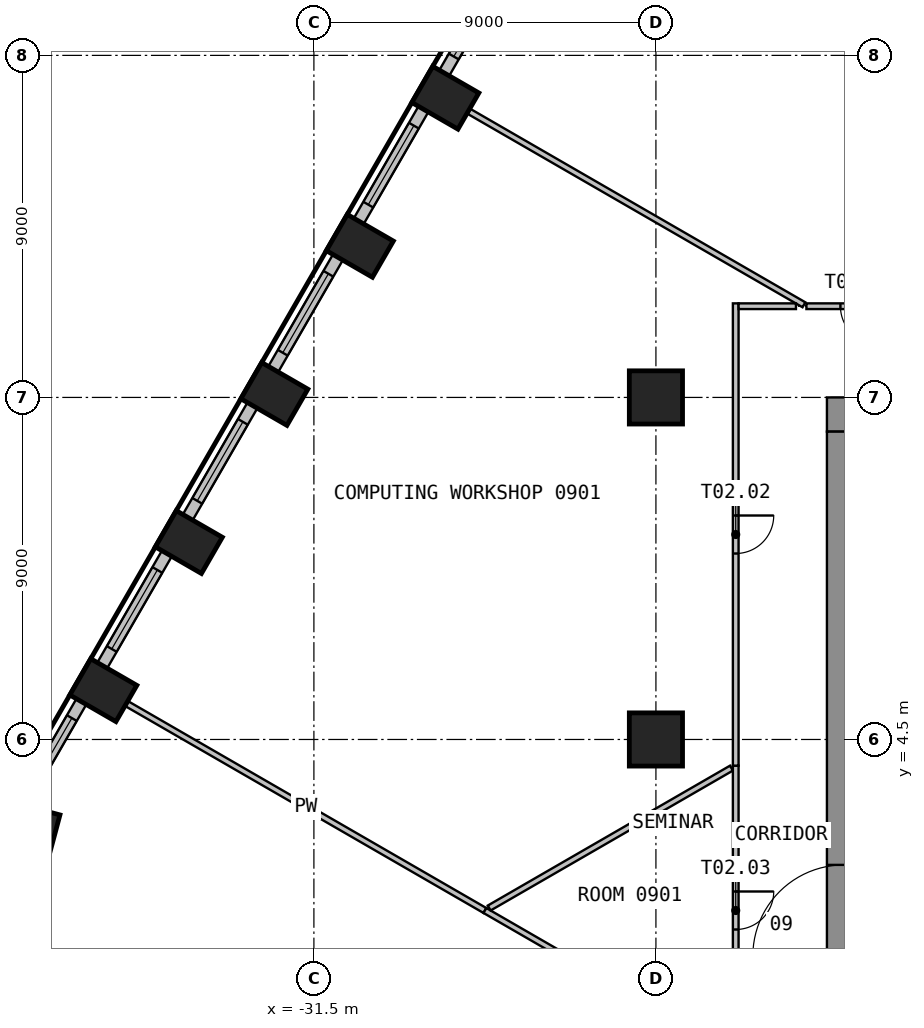
"""IFC4 building model, lengths in metres.
Left out: names, types, materials, properties, quantities, classifications, styles, units other than length and angle.
Written with IfcOpenShell. Run it as: python <this file> out.ifc"""

import sys

from ifc_helpers import new_model, si_unit, direction, frame, frame_2d, origin, origin_2d, place, context, subcontext, project, spatial, rectangle, circle, extrude, element, fill, save


model = new_model("IFC4")
c1 = context("Model", 3, precision=1e-05, world=origin(), true_north=direction((0.0, 1.0)))
c2 = subcontext(c1, "Body", "Model", "MODEL_VIEW")
j1 = project(units=[si_unit("LENGTHUNIT", "METRE"), si_unit("PLANEANGLEUNIT", "RADIAN")], contexts=[c1])
p1 = place(None, origin())
s1 = spatial("IfcSite", under=j1, at=p1, CompositionType="ELEMENT")
p2 = place(p1, origin())
s2 = spatial("IfcBuilding", under=s1, at=p2, CompositionType="ELEMENT")
p3 = place(p2, frame((0.0, 0.0, 41.7)))
s3 = spatial("IfcBuildingStorey", under=s2, at=p3, CompositionType="ELEMENT", Elevation=41.7)
for number, where, z_axis, x_axis in (
    (1, (-28.041, 21.385, 0.0), (0.0, 0.0, 1.0), (-0.5, -0.866, 0.0)),
    (2, (-30.291, 17.489, 0.0), (0.0, 0.0, 1.0), (-0.5, -0.866, 0.0)),
    (3, (-32.541, 13.591, 0.0), (0.0, 0.0, 1.0), (-0.5, -0.866, 0.0)),
    (4, (-34.791, 9.694, 0.0), (0.0, 0.0, 1.0), (-0.5, -0.866, 0.0)),
    (5, (-37.041, 5.797, 0.0), (0.0, 0.0, 1.0), (-0.5, -0.866, 0.0)),
):
    element("IfcColumn", number, at=place(p3, frame(where, z_axis=z_axis, x_axis=x_axis)), inside=s3, PredefinedType="COLUMN", context=c2, shape_type="SweptSolid", body=[
        extrude(rectangle(XDim=1.1, YDim=1.4, at=origin_2d()), origin(), (0.0, 0.0, 1.0), 3.525),
    ])
p4 = place(p3, frame((-39.04, 2.02, 0.0), z_axis=(0.0, 0.0, 1.0), x_axis=(-0.258819045103, -0.965925826289, 0.0)))
e6 = element("IfcColumn", 6, at=p4, inside=s3, PredefinedType="COLUMN", context=c2, shape_type="SweptSolid", body=[
    extrude(rectangle(XDim=1.4, YDim=1.4, at=origin_2d()), origin(), (0.0, 0.0, 1.0), 3.525),
])
for number, where, z_axis, x_axis in (
    (7, (-22.5, 4.5, 0.0), (0.0, 0.0, 1.0), (1.0, 0.0, 0.0)),
    (8, (-22.5, 13.5, 0.0), (0.0, 0.0, 1.0), (1.0, 0.0, 0.0)),
):
    element("IfcColumn", number, at=place(p3, frame(where, z_axis=z_axis, x_axis=x_axis)), inside=s3, PredefinedType="COLUMN", context=c2, shape_type="SweptSolid", body=[
        extrude(circle(Radius=0.7, at=origin_2d()), origin(), (0.0, 0.0, 1.0), 3.525),
    ])
p5 = place(p3, frame((-26.369, 24.981, 0.0), z_axis=(0.0, 0.0, 1.0), x_axis=(-0.499993955907, -0.866028893315, 0.0)))
e9 = element("IfcWall", 9, at=p5, inside=s3, PredefinedType="SOLIDWALL", context=c2, shape_type="SweptSolid", body=[
    extrude(rectangle(XDim=3.399, YDim=0.3, at=frame_2d((1.699, 0.0))), origin(), (0.0, 0.0, 1.0), 3.525),
])
p6 = place(p5, frame((0.5, 0.0, 0.9)))
e10 = element("IfcOpeningElement", 10, at=p6, cuts=e9, PredefinedType="OPENING", context=c2, shape_type="SweptSolid", body=[
    extrude(rectangle(XDim=2.4, YDim=2.1, at=frame_2d((1.2, 1.05))), frame((0.0, 0.16, 0.0), z_axis=(0.0, -1.0, 0.0), x_axis=(1.0, 0.0, 0.0)), (0.0, 0.0, 1.0), 0.32),
])
p7 = place(p3, frame((-28.619, 21.084, 0.0), z_axis=(0.0, 0.0, 1.0), x_axis=(-0.499993955907, -0.866028893315, 0.0)))
e11 = element("IfcWall", 11, at=p7, inside=s3, PredefinedType="SOLIDWALL", context=c2, shape_type="SweptSolid", body=[
    extrude(rectangle(XDim=3.399, YDim=0.3, at=frame_2d((1.699, 0.0))), origin(), (0.0, 0.0, 1.0), 3.525),
])
p8 = place(p7, frame((0.5, 0.0, 0.9)))
e12 = element("IfcOpeningElement", 12, at=p8, cuts=e11, PredefinedType="OPENING", context=c2, shape_type="SweptSolid", body=[
    extrude(rectangle(XDim=2.4, YDim=2.1, at=frame_2d((1.2, 1.05))), frame((0.0, 0.16, 0.0), z_axis=(0.0, -1.0, 0.0), x_axis=(1.0, 0.0, 0.0)), (0.0, 0.0, 1.0), 0.32),
])
p9 = place(p3, frame((-30.869, 17.187, 0.0), z_axis=(0.0, 0.0, 1.0), x_axis=(-0.499993955907, -0.866028893315, 0.0)))
e13 = element("IfcWall", 13, at=p9, inside=s3, PredefinedType="SOLIDWALL", context=c2, shape_type="SweptSolid", body=[
    extrude(rectangle(XDim=3.399, YDim=0.3, at=frame_2d((1.699, 0.0))), origin(), (0.0, 0.0, 1.0), 3.525),
])
p10 = place(p9, frame((0.5, 0.0, 0.9)))
e14 = element("IfcOpeningElement", 14, at=p10, cuts=e13, PredefinedType="OPENING", context=c2, shape_type="SweptSolid", body=[
    extrude(rectangle(XDim=2.4, YDim=2.1, at=frame_2d((1.2, 1.05))), frame((0.0, 0.16, 0.0), z_axis=(0.0, -1.0, 0.0), x_axis=(1.0, 0.0, 0.0)), (0.0, 0.0, 1.0), 0.32),
])
p11 = place(p3, frame((-33.119, 13.29, 0.0), z_axis=(0.0, 0.0, 1.0), x_axis=(-0.499993955907, -0.866028893315, 0.0)))
e15 = element("IfcWall", 15, at=p11, inside=s3, PredefinedType="SOLIDWALL", context=c2, shape_type="SweptSolid", body=[
    extrude(rectangle(XDim=3.399, YDim=0.3, at=frame_2d((1.699, 0.0))), origin(), (0.0, 0.0, 1.0), 3.525),
])
p12 = place(p11, frame((0.5, 0.0, 0.9)))
e16 = element("IfcOpeningElement", 16, at=p12, cuts=e15, PredefinedType="OPENING", context=c2, shape_type="SweptSolid", body=[
    extrude(rectangle(XDim=2.4, YDim=2.1, at=frame_2d((1.2, 1.05))), frame((0.0, 0.16, 0.0), z_axis=(0.0, -1.0, 0.0), x_axis=(1.0, 0.0, 0.0)), (0.0, 0.0, 1.0), 0.32),
])
p13 = place(p3, frame((-35.369, 9.393, 0.0), z_axis=(0.0, 0.0, 1.0), x_axis=(-0.499993955907, -0.866028893315, 0.0)))
e17 = element("IfcWall", 17, at=p13, inside=s3, PredefinedType="SOLIDWALL", context=c2, shape_type="SweptSolid", body=[
    extrude(rectangle(XDim=3.399, YDim=0.3, at=frame_2d((1.699, 0.0))), origin(), (0.0, 0.0, 1.0), 3.525),
])
p14 = place(p13, frame((0.5, 0.0, 0.9)))
e18 = element("IfcOpeningElement", 18, at=p14, cuts=e17, PredefinedType="OPENING", context=c2, shape_type="SweptSolid", body=[
    extrude(rectangle(XDim=2.4, YDim=2.1, at=frame_2d((1.2, 1.05))), frame((0.0, 0.16, 0.0), z_axis=(0.0, -1.0, 0.0), x_axis=(1.0, 0.0, 0.0)), (0.0, 0.0, 1.0), 0.32),
])
p15 = place(p3, frame((-37.619, 5.495, 0.0), z_axis=(0.0, 0.0, 1.0), x_axis=(-0.49997090907, -0.866042198789, 0.0)))
e19 = element("IfcWall", 19, at=p15, inside=s3, PredefinedType="SOLIDWALL", context=c2, shape_type="SweptSolid", body=[
    extrude(rectangle(XDim=3.091, YDim=0.3, at=frame_2d((1.545, 0.0))), origin(), (0.0, 0.0, 1.0), 3.525),
])
p16 = place(p15, frame((0.5, 0.0, 0.9)))
e20 = element("IfcOpeningElement", 20, at=p16, cuts=e19, PredefinedType="OPENING", context=c2, shape_type="SweptSolid", body=[
    extrude(rectangle(XDim=2.4, YDim=2.1, at=frame_2d((1.2, 1.05))), frame((0.0, 0.16, 0.0), z_axis=(0.0, -1.0, 0.0), x_axis=(1.0, 0.0, 0.0)), (0.0, 0.0, 1.0), 0.32),
])
p17 = place(p3, frame((-18.0, 13.05, 0.0), z_axis=(0.0, 0.0, 1.0), x_axis=(1.0, 0.0, 0.0)))
e21 = element("IfcWall", 21, at=p17, inside=s3, PredefinedType="SHEAR", context=c2, shape_type="SweptSolid", body=[
    extrude(rectangle(XDim=36.0, YDim=0.9, at=frame_2d((18.0, 0.0))), origin(), (0.0, 0.0, 1.0), 3.525),
])
p18 = place(p17, frame((16.8, 0.0, 0.0)))
e22 = element("IfcOpeningElement", 22, at=p18, cuts=e21, PredefinedType="OPENING", context=c2, shape_type="SweptSolid", body=[
    extrude(rectangle(XDim=2.4, YDim=2.1, at=frame_2d((1.2, 1.05))), frame((0.0, 0.46, 0.0), z_axis=(0.0, -1.0, 0.0), x_axis=(1.0, 0.0, 0.0)), (0.0, 0.0, 1.0), 0.92),
])
p19 = place(p17, frame((5.55, 0.0, 0.0)))
e23 = element("IfcOpeningElement", 23, at=p19, cuts=e21, PredefinedType="OPENING", context=c2, shape_type="SweptSolid", body=[
    extrude(rectangle(XDim=1.2, YDim=2.1, at=frame_2d((0.6, 1.05))), frame((0.0, 0.46, 0.0), z_axis=(0.0, -1.0, 0.0), x_axis=(1.0, 0.0, 0.0)), (0.0, 0.0, 1.0), 0.92),
])
p20 = place(p17, frame((29.25, 0.0, 0.0)))
e24 = element("IfcOpeningElement", 24, at=p20, cuts=e21, PredefinedType="OPENING", context=c2, shape_type="SweptSolid", body=[
    extrude(rectangle(XDim=1.2, YDim=2.1, at=frame_2d((0.6, 1.05))), frame((0.0, 0.46, 0.0), z_axis=(0.0, -1.0, 0.0), x_axis=(1.0, 0.0, 0.0)), (0.0, 0.0, 1.0), 0.92),
])
p21 = place(p3, frame((-17.55, -12.6, 0.0), z_axis=(0.0, 0.0, 1.0), x_axis=(0.0, 1.0, 0.0)))
e25 = element("IfcWall", 25, at=p21, inside=s3, PredefinedType="SHEAR", context=c2, shape_type="SweptSolid", body=[
    extrude(rectangle(XDim=25.2, YDim=0.9, at=frame_2d((12.6, 0.0))), origin(), (0.0, 0.0, 1.0), 3.525),
])
p22 = place(p21, frame((11.4, 0.0, 0.0)))
e26 = element("IfcOpeningElement", 26, at=p22, cuts=e25, PredefinedType="OPENING", context=c2, shape_type="SweptSolid", body=[
    extrude(rectangle(XDim=2.4, YDim=2.1, at=frame_2d((1.2, 1.05))), frame((0.0, 0.46, 0.0), z_axis=(0.0, -1.0, 0.0), x_axis=(1.0, 0.0, 0.0)), (0.0, 0.0, 1.0), 0.92),
])
p23 = place(p3, frame((-36.417, 5.437, 0.0), z_axis=(0.0, 0.0, 1.0), x_axis=(0.866016964551, -0.500014616896, 0.0)))
e27 = element("IfcWall", 27, at=p23, inside=s3, PredefinedType="PARTITIONING", context=c2, shape_type="SweptSolid", body=[
    extrude(rectangle(XDim=10.874, YDim=0.15, at=frame_2d((5.437, 0.0))), origin(), (0.0, 0.0, 1.0), 3.525),
])
p24 = place(p3, frame((-27.417, 21.026, 0.0), z_axis=(0.0, 0.0, 1.0), x_axis=(0.86599299422, -0.500056130812, 0.0)))
e28 = element("IfcWall", 28, at=p24, inside=s3, PredefinedType="PARTITIONING", context=c2, shape_type="SweptSolid", body=[
    extrude(rectangle(XDim=10.176, YDim=0.15, at=frame_2d((5.088, 0.0))), origin(), (0.0, 0.0, 1.0), 3.525),
])
p25 = place(p3, frame((-27.0, 0.0, 0.0), z_axis=(0.0, 0.0, 1.0), x_axis=(0.865996173008, -0.500050625772, 0.0)))
e29 = element("IfcWall", 29, at=p25, inside=s3, PredefinedType="PARTITIONING", context=c2, shape_type="SweptSolid", body=[
    extrude(rectangle(XDim=7.491, YDim=0.15, at=frame_2d((3.746, 0.0))), origin(), (0.0, 0.0, 1.0), 3.525),
])
p26 = place(p3, frame((-20.512, 3.746, 0.0), z_axis=(0.0, 0.0, 1.0), x_axis=(-0.865993380977, -0.500055461028, 0.0)))
e30 = element("IfcWall", 30, at=p26, inside=s3, PredefinedType="PARTITIONING", context=c2, shape_type="SweptSolid", body=[
    extrude(rectangle(XDim=7.362, YDim=0.15, at=frame_2d((3.681, 0.0))), origin(), (0.0, 0.0, 1.0), 3.525),
])
p27 = place(p3, frame((-20.4, 3.811, 0.0), z_axis=(0.0, 0.0, 1.0), x_axis=(0.0, -1.0, 0.0)))
e31 = element("IfcWall", 31, at=p27, inside=s3, PredefinedType="PARTITIONING", context=c2, shape_type="SweptSolid", body=[
    extrude(rectangle(XDim=7.622, YDim=0.15, at=frame_2d((3.811, 0.0))), origin(), (0.0, 0.0, 1.0), 3.525),
])
p28 = place(p27, frame((3.311, 0.0, 0.0)))
e32 = element("IfcOpeningElement", 32, at=p28, cuts=e31, PredefinedType="OPENING", context=c2, shape_type="SweptSolid", body=[
    extrude(rectangle(XDim=1.0, YDim=2.1, at=frame_2d((0.5, 1.05))), frame((0.0, 0.085, 0.0), z_axis=(0.0, -1.0, 0.0), x_axis=(1.0, 0.0, 0.0)), (0.0, 0.0, 1.0), 0.17),
])
p29 = place(p3, frame((-20.4, 15.975, 0.0), z_axis=(0.0, 0.0, 1.0), x_axis=(0.0, -1.0, 0.0)))
e33 = element("IfcWall", 33, at=p29, inside=s3, PredefinedType="PARTITIONING", context=c2, shape_type="SweptSolid", body=[
    extrude(rectangle(XDim=12.164, YDim=0.15, at=frame_2d((6.082, 0.0))), origin(), (0.0, 0.0, 1.0), 3.525),
])
p30 = place(p29, frame((5.582, 0.0, 0.0)))
e34 = element("IfcOpeningElement", 34, at=p30, cuts=e33, PredefinedType="OPENING", context=c2, shape_type="SweptSolid", body=[
    extrude(rectangle(XDim=1.0, YDim=2.1, at=frame_2d((0.5, 1.05))), frame((0.0, 0.085, 0.0), z_axis=(0.0, -1.0, 0.0), x_axis=(1.0, 0.0, 0.0)), (0.0, 0.0, 1.0), 0.17),
])
p31 = place(p3, frame((-18.815, 15.9, 0.0), z_axis=(0.0, 0.0, 1.0), x_axis=(-1.0, 0.0, 0.0)))
e35 = element("IfcWall", 35, at=p31, inside=s3, PredefinedType="PARTITIONING", context=c2, shape_type="SweptSolid", body=[
    extrude(rectangle(XDim=1.51, YDim=0.15, at=frame_2d((0.755, 0.0))), origin(), (0.0, 0.0, 1.0), 3.525),
])
p32 = place(p3, frame((-15.75, 15.9, 0.0), z_axis=(0.0, 0.0, 1.0), x_axis=(-1.0, 0.0, 0.0)))
e36 = element("IfcWall", 36, at=p32, inside=s3, PredefinedType="PARTITIONING", context=c2, shape_type="SweptSolid", body=[
    extrude(rectangle(XDim=2.79, YDim=0.15, at=frame_2d((1.395, 0.0))), origin(), (0.0, 0.0, 1.0), 3.525),
])
p33 = place(p32, frame((0.895, 0.0, 0.0)))
e37 = element("IfcOpeningElement", 37, at=p33, cuts=e36, PredefinedType="OPENING", context=c2, shape_type="SweptSolid", body=[
    extrude(rectangle(XDim=1.0, YDim=2.1, at=frame_2d((0.5, 1.05))), frame((0.0, 0.085, 0.0), z_axis=(0.0, -1.0, 0.0), x_axis=(1.0, 0.0, 0.0)), (0.0, 0.0, 1.0), 0.17),
])
p34 = place(p6, origin())
e38 = element("IfcWindow", 38, at=p34, inside=s3, PartitioningType="SINGLE_PANEL", PredefinedType="WINDOW", context=c2, shape_type="SweptSolid", body=[
    extrude(rectangle(XDim=2.4, YDim=2.1, at=frame_2d((1.2, 1.05))), frame((0.0, 0.03, 0.0), z_axis=(0.0, -1.0, 0.0), x_axis=(1.0, 0.0, 0.0)), (0.0, 0.0, 1.0), 0.06),
])
fill(e10, e38)
p35 = place(p8, origin())
e39 = element("IfcWindow", 39, at=p35, inside=s3, PartitioningType="SINGLE_PANEL", PredefinedType="WINDOW", context=c2, shape_type="SweptSolid", body=[
    extrude(rectangle(XDim=2.4, YDim=2.1, at=frame_2d((1.2, 1.05))), frame((0.0, 0.03, 0.0), z_axis=(0.0, -1.0, 0.0), x_axis=(1.0, 0.0, 0.0)), (0.0, 0.0, 1.0), 0.06),
])
fill(e12, e39)
p36 = place(p10, origin())
e40 = element("IfcWindow", 40, at=p36, inside=s3, PartitioningType="SINGLE_PANEL", PredefinedType="WINDOW", context=c2, shape_type="SweptSolid", body=[
    extrude(rectangle(XDim=2.4, YDim=2.1, at=frame_2d((1.2, 1.05))), frame((0.0, 0.03, 0.0), z_axis=(0.0, -1.0, 0.0), x_axis=(1.0, 0.0, 0.0)), (0.0, 0.0, 1.0), 0.06),
])
fill(e14, e40)
p37 = place(p12, origin())
e41 = element("IfcWindow", 41, at=p37, inside=s3, PartitioningType="SINGLE_PANEL", PredefinedType="WINDOW", context=c2, shape_type="SweptSolid", body=[
    extrude(rectangle(XDim=2.4, YDim=2.1, at=frame_2d((1.2, 1.05))), frame((0.0, 0.03, 0.0), z_axis=(0.0, -1.0, 0.0), x_axis=(1.0, 0.0, 0.0)), (0.0, 0.0, 1.0), 0.06),
])
fill(e16, e41)
p38 = place(p14, origin())
e42 = element("IfcWindow", 42, at=p38, inside=s3, PartitioningType="SINGLE_PANEL", PredefinedType="WINDOW", context=c2, shape_type="SweptSolid", body=[
    extrude(rectangle(XDim=2.4, YDim=2.1, at=frame_2d((1.2, 1.05))), frame((0.0, 0.03, 0.0), z_axis=(0.0, -1.0, 0.0), x_axis=(1.0, 0.0, 0.0)), (0.0, 0.0, 1.0), 0.06),
])
fill(e18, e42)
p39 = place(p16, origin())
e43 = element("IfcWindow", 43, at=p39, inside=s3, PartitioningType="SINGLE_PANEL", PredefinedType="WINDOW", context=c2, shape_type="SweptSolid", body=[
    extrude(rectangle(XDim=2.4, YDim=2.1, at=frame_2d((1.2, 1.05))), frame((0.0, 0.03, 0.0), z_axis=(0.0, -1.0, 0.0), x_axis=(1.0, 0.0, 0.0)), (0.0, 0.0, 1.0), 0.06),
])
fill(e20, e43)
p40 = place(p22, origin())
e44 = element("IfcDoor", 44, at=p40, inside=s3, OperationType="DOUBLE_DOOR_DOUBLE_SWING", PredefinedType="DOOR", context=c2, shape_type="SweptSolid", body=[
    extrude(rectangle(XDim=2.4, YDim=2.1, at=frame_2d((1.2, 1.05))), frame((0.0, 0.025, 0.0), z_axis=(0.0, -1.0, 0.0), x_axis=(1.0, 0.0, 0.0)), (0.0, 0.0, 1.0), 0.05),
])
fill(e26, e44)
p41 = place(p30, origin())
e45 = element("IfcDoor", 45, at=p41, inside=s3, OperationType="SINGLE_SWING_LEFT", PredefinedType="DOOR", context=c2, shape_type="SweptSolid", body=[
    extrude(rectangle(XDim=1.0, YDim=2.1, at=frame_2d((0.5, 1.05))), frame((0.0, 0.025, 0.0), z_axis=(0.0, -1.0, 0.0), x_axis=(1.0, 0.0, 0.0)), (0.0, 0.0, 1.0), 0.05),
])
fill(e34, e45)
p42 = place(p28, origin())
e46 = element("IfcDoor", 46, at=p42, inside=s3, OperationType="SINGLE_SWING_RIGHT", PredefinedType="DOOR", context=c2, shape_type="SweptSolid", body=[
    extrude(rectangle(XDim=1.0, YDim=2.1, at=frame_2d((0.5, 1.05))), frame((0.0, 0.025, 0.0), z_axis=(0.0, -1.0, 0.0), x_axis=(1.0, 0.0, 0.0)), (0.0, 0.0, 1.0), 0.05),
])
fill(e32, e46)
p43 = place(p33, origin())
e47 = element("IfcDoor", 47, at=p43, inside=s3, OperationType="SINGLE_SWING_LEFT", PredefinedType="DOOR", context=c2, shape_type="SweptSolid", body=[
    extrude(rectangle(XDim=1.0, YDim=2.1, at=frame_2d((0.5, 1.05))), frame((0.0, 0.025, 0.0), z_axis=(0.0, -1.0, 0.0), x_axis=(1.0, 0.0, 0.0)), (0.0, 0.0, 1.0), 0.05),
])
fill(e37, e47)
save(model, sys.argv[1])
